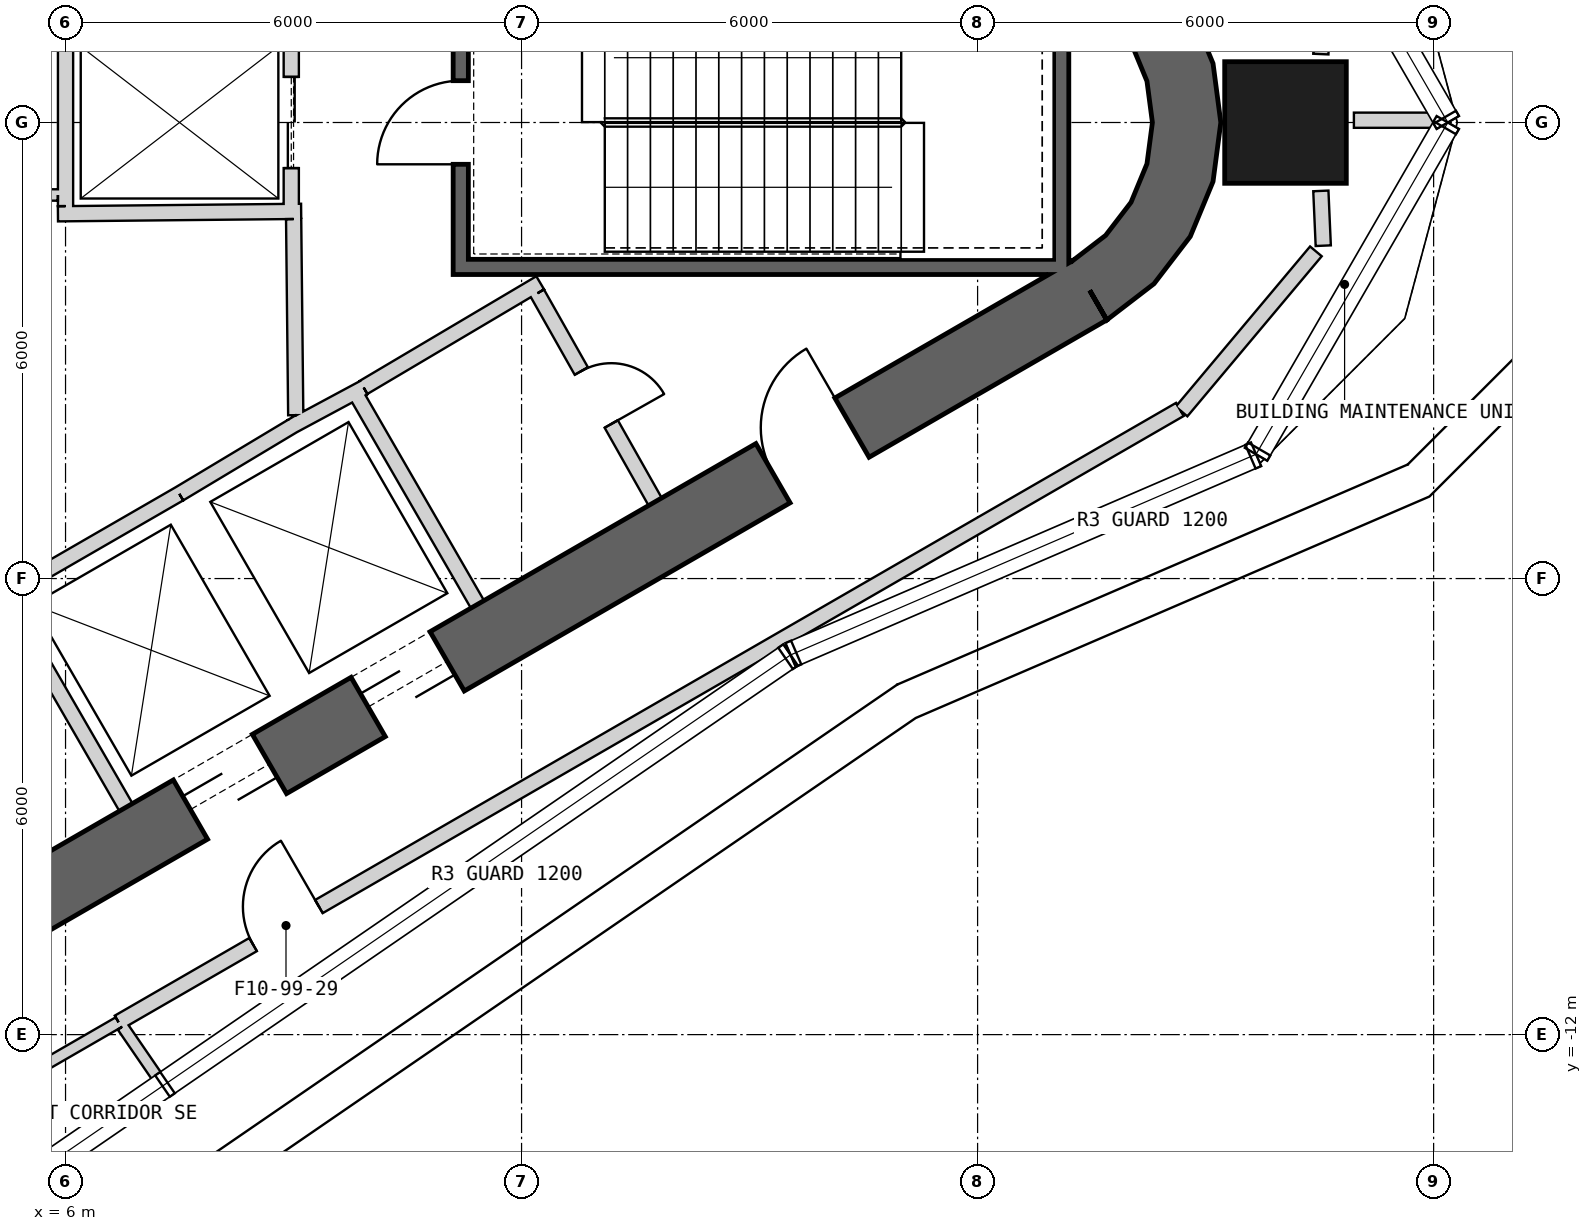
"""IFC4 building model, lengths in metres.
Left out: names, types, materials, properties, quantities, classifications, styles, units other than length and angle.
Written with IfcOpenShell. Run it as: python <this file> out.ifc"""

import sys

from ifc_helpers import new_model, si_unit, direction, frame, frame_2d, origin, origin_2d, place, context, subcontext, project, spatial, polyline, rectangle, outline, extrude, element, fill, save


model = new_model("IFC4")
c1 = context("Model", 3, precision=1e-05, world=origin(), true_north=direction((0.0, 1.0)))
c2 = subcontext(c1, "Body", "Model", "MODEL_VIEW")
j1 = project(units=[si_unit("LENGTHUNIT", "METRE"), si_unit("PLANEANGLEUNIT", "RADIAN")], contexts=[c1])
p1 = place(None, origin())
s1 = spatial("IfcSite", under=j1, at=p1, CompositionType="ELEMENT")
p2 = place(p1, origin())
s2 = spatial("IfcBuilding", under=s1, at=p2, CompositionType="ELEMENT")
p3 = place(p2, frame((0.0, 0.0, 440.3)))
s3 = spatial("IfcBuildingStorey", under=s2, at=p3, CompositionType="ELEMENT", Elevation=440.3)
p4 = place(p3, frame((22.051, 0.0, 0.0), z_axis=(0.0, 0.0, 1.0), x_axis=(1.0, 0.0, 0.0)))
e1 = element("IfcColumn", 1, at=p4, inside=s3, PredefinedType="COLUMN", context=c2, shape_type="SweptSolid", body=[
    extrude(rectangle(XDim=1.6, YDim=1.6, at=origin_2d()), origin(), (0.0, 0.0, 1.0), 4.7),
])
p5 = place(p3, frame((-7.825, -17.97, 0.0), z_axis=(0.0, 0.0, 1.0), x_axis=(0.866028369851, 0.499994862586, 0.0)))
e2 = element("IfcWall", 2, at=p5, inside=s3, PredefinedType="SHEAR", context=c2, shape_type="SweptSolid", body=[
    extrude(rectangle(XDim=31.523, YDim=0.9, at=frame_2d((15.762, 0.0))), origin(), (0.0, 0.0, 1.0), 4.7),
])
p6 = place(p5, frame((17.862, 0.0, 0.0)))
e3 = element("IfcOpeningElement", 3, at=p6, cuts=e2, PredefinedType="OPENING", context=c2, shape_type="SweptSolid", body=[
    extrude(rectangle(XDim=1.2, YDim=2.4, at=frame_2d((0.6, 1.2))), frame((0.0, 0.46, 0.0), z_axis=(0.0, -1.0, 0.0), x_axis=(1.0, 0.0, 0.0)), (0.0, 0.0, 1.0), 0.92),
])
p7 = place(p5, frame((20.562, 0.0, 0.0)))
e4 = element("IfcOpeningElement", 4, at=p7, cuts=e2, PredefinedType="OPENING", context=c2, shape_type="SweptSolid", body=[
    extrude(rectangle(XDim=1.2, YDim=2.4, at=frame_2d((0.6, 1.2))), frame((0.0, 0.46, 0.0), z_axis=(0.0, -1.0, 0.0), x_axis=(1.0, 0.0, 0.0)), (0.0, 0.0, 1.0), 0.92),
])
p8 = place(p5, frame((26.712, 0.0, 0.0)))
e5 = element("IfcOpeningElement", 5, at=p8, cuts=e2, PredefinedType="OPENING", context=c2, shape_type="SweptSolid", body=[
    extrude(rectangle(XDim=1.2, YDim=2.4, at=frame_2d((0.6, 1.2))), frame((0.0, 0.46, 0.0), z_axis=(0.0, -1.0, 0.0), x_axis=(1.0, 0.0, 0.0)), (0.0, 0.0, 1.0), 0.92),
])
p9 = place(p5, frame((3.612, 0.0, 0.0)))
e6 = element("IfcOpeningElement", 6, at=p9, cuts=e2, PredefinedType="OPENING", context=c2, shape_type="SweptSolid", body=[
    extrude(rectangle(XDim=1.2, YDim=2.4, at=frame_2d((0.6, 1.2))), frame((0.0, 0.46, 0.0), z_axis=(0.0, -1.0, 0.0), x_axis=(1.0, 0.0, 0.0)), (0.0, 0.0, 1.0), 0.92),
])
p10 = place(p3, origin())
e7 = element("IfcWall", 7, at=p10, inside=s3, PredefinedType="SHEAR", context=c2, shape_type="SweptSolid", body=[
    extrude(outline(polyline([(19.7, -2.598), (20.321, -2.121), (20.798, -1.5), (21.098, -0.777), (21.2, 0.0), (21.098, 0.777), (20.798, 1.5), (20.321, 2.121), (19.7, 2.598), (19.25, 1.819), (19.685, 1.485), (20.019, 1.05), (20.229, 0.543), (20.3, 0.0), (20.229, -0.543), (20.019, -1.05), (19.685, -1.485), (19.25, -1.819), (19.7, -2.598)])), origin(), (0.0, 0.0, 1.0), 4.7),
])
p11 = place(p3, frame((6.795, -9.01, 0.0), z_axis=(0.0, 0.0, 1.0), x_axis=(-0.499984717929, 0.866034226713, 0.0)))
e8 = element("IfcWall", 8, at=p11, inside=s3, PredefinedType="PLUMBINGWALL", context=c2, shape_type="SweptSolid", body=[
    extrude(rectangle(XDim=3.25, YDim=0.2, at=frame_2d((1.625, 0.0))), origin(), (0.0, 0.0, 1.0), 4.7),
])
p12 = place(p3, frame((5.159, -6.236, 0.0), z_axis=(0.0, 0.0, 1.0), x_axis=(0.866036505625, 0.499980770555, 0.0)))
e9 = element("IfcWall", 9, at=p12, inside=s3, PredefinedType="PLUMBINGWALL", context=c2, shape_type="SweptSolid", body=[
    extrude(rectangle(XDim=2.7, YDim=0.2, at=frame_2d((1.35, 0.0))), origin(), (0.0, 0.0, 1.0), 4.7),
])
p13 = place(p3, frame((9.795, -3.525, 0.0), z_axis=(0.0, 0.0, 1.0), x_axis=(0.499984717929, -0.866034226713, 0.0)))
e10 = element("IfcWall", 10, at=p13, inside=s3, PredefinedType="PLUMBINGWALL", context=c2, shape_type="SweptSolid", body=[
    extrude(rectangle(XDim=3.25, YDim=0.2, at=frame_2d((1.625, 0.0))), origin(), (0.0, 0.0, 1.0), 4.7),
])
p14 = place(p3, frame((8.974, -3.999, 0.0), z_axis=(0.0, 0.0, 1.0), x_axis=(0.880907015104, 0.473289373154, 0.0)))
e11 = element("IfcWall", 11, at=p14, inside=s3, PredefinedType="PLUMBINGWALL", context=c2, shape_type="SweptSolid", body=[
    extrude(rectangle(XDim=1.078, YDim=0.2, at=frame_2d((0.539, 0.0))), origin(), (0.0, 0.0, 1.0), 4.7),
])
p15 = place(p3, frame((7.497, -4.886, 0.0), z_axis=(0.0, 0.0, 1.0), x_axis=(0.857516281273, 0.51445682749, 0.0)))
e12 = element("IfcWall", 12, at=p15, inside=s3, PredefinedType="PLUMBINGWALL", context=c2, shape_type="SweptSolid", body=[
    extrude(rectangle(XDim=1.845, YDim=0.2, at=frame_2d((0.922, 0.0))), origin(), (0.0, 0.0, 1.0), 4.7),
])
p16 = place(p3, frame((19.1, -2.0, -0.25), z_axis=(0.0, 0.0, 1.0), x_axis=(0.0, 1.0, 0.0)))
e13 = element("IfcWall", 13, at=p16, inside=s3, PredefinedType="SHEAR", context=c2, shape_type="SweptSolid", body=[
    extrude(rectangle(XDim=3.8, YDim=0.2, at=frame_2d((1.9, 0.0))), origin(), (0.0, 0.0, 1.0), 4.95),
])
p17 = place(p3, frame((11.1, -1.9, -0.25), z_axis=(0.0, 0.0, 1.0), x_axis=(1.0, 0.0, 0.0)))
e14 = element("IfcWall", 14, at=p17, inside=s3, PredefinedType="SHEAR", context=c2, shape_type="SweptSolid", body=[
    extrude(rectangle(XDim=7.9, YDim=0.2, at=frame_2d((3.95, 0.0))), origin(), (0.0, 0.0, 1.0), 4.95),
])
p18 = place(p3, frame((11.2, -1.8, -0.25), z_axis=(0.0, 0.0, 1.0), x_axis=(0.0, 1.0, 0.0)))
e15 = element("IfcWall", 15, at=p18, inside=s3, PredefinedType="SHEAR", context=c2, shape_type="SweptSolid", body=[
    extrude(rectangle(XDim=3.6, YDim=0.2, at=frame_2d((1.8, 0.0))), origin(), (0.0, 0.0, 1.0), 4.95),
])
p19 = place(p18, frame((1.25, 0.0, 0.25)))
e16 = element("IfcOpeningElement", 16, at=p19, cuts=e15, PredefinedType="OPENING", context=c2, shape_type="SweptSolid", body=[
    extrude(rectangle(XDim=1.1, YDim=2.1, at=frame_2d((0.55, 1.05))), frame((0.0, 0.11, 0.0), z_axis=(0.0, -1.0, 0.0), x_axis=(1.0, 0.0, 0.0)), (0.0, 0.0, 1.0), 0.22),
])
p20 = place(p3, frame((8.97, 1.2, 0.0), z_axis=(0.0, 0.0, 1.0), x_axis=(0.0, -1.0, 0.0)))
e17 = element("IfcWall", 17, at=p20, inside=s3, PredefinedType="PLUMBINGWALL", context=c2, shape_type="SweptSolid", body=[
    extrude(rectangle(XDim=2.4, YDim=0.2, at=frame_2d((1.2, 0.0))), origin(), (0.0, 0.0, 1.0), 4.7),
])
p21 = place(p20, frame((0.6, 0.0, 0.0)))
e18 = element("IfcOpeningElement", 18, at=p21, cuts=e17, PredefinedType="OPENING", context=c2, shape_type="SweptSolid", body=[
    extrude(rectangle(XDim=1.2, YDim=2.4, at=frame_2d((0.6, 1.2))), frame((0.0, 0.11, 0.0), z_axis=(0.0, -1.0, 0.0), x_axis=(1.0, 0.0, 0.0)), (0.0, 0.0, 1.0), 0.22),
])
p22 = place(p3, frame((9.1, -1.169, 0.0), z_axis=(0.0, 0.0, 1.0), x_axis=(-0.999950064753, -0.009993397809, 0.0)))
e19 = element("IfcWall", 19, at=p22, inside=s3, PredefinedType="PLUMBINGWALL", context=c2, shape_type="SweptSolid", body=[
    extrude(rectangle(XDim=3.2, YDim=0.2, at=frame_2d((1.6, 0.0))), origin(), (0.0, 0.0, 1.0), 4.7),
])
p23 = place(p3, frame((6.0, -1.1, 0.0), z_axis=(0.0, 0.0, 1.0), x_axis=(0.0, 1.0, 0.0)))
e20 = element("IfcWall", 20, at=p23, inside=s3, PredefinedType="PLUMBINGWALL", context=c2, shape_type="SweptSolid", body=[
    extrude(rectangle(XDim=2.4, YDim=0.2, at=frame_2d((1.2, 0.0))), origin(), (0.0, 0.0, 1.0), 4.7),
])
p24 = place(p3, frame((12.245, -2.109, 0.0), z_axis=(0.0, 0.0, 1.0), x_axis=(-0.860414880418, -0.509594185166, 0.0)))
e21 = element("IfcWall", 21, at=p24, inside=s3, PredefinedType="PARTITIONING", context=c2, shape_type="SweptSolid", body=[
    extrude(rectangle(XDim=2.7, YDim=0.2, at=frame_2d((1.35, 0.0))), origin(), (0.0, 0.0, 1.0), 4.7),
])
p25 = place(p3, frame((13.758, -4.99, 0.0), z_axis=(0.0, 0.0, 1.0), x_axis=(-0.491993409184, 0.87059892334, 0.0)))
e22 = element("IfcWall", 22, at=p25, inside=s3, PredefinedType="PARTITIONING", context=c2, shape_type="SweptSolid", body=[
    extrude(rectangle(XDim=3.15, YDim=0.2, at=frame_2d((1.575, 0.0))), origin(), (0.0, 0.0, 1.0), 4.7),
])
p26 = place(p25, frame((1.175, 0.0, 0.0)))
e23 = element("IfcOpeningElement", 23, at=p26, cuts=e22, PredefinedType="OPENING", context=c2, shape_type="SweptSolid", body=[
    extrude(rectangle(XDim=0.8, YDim=2.1, at=frame_2d((0.4, 1.05))), frame((0.0, 0.11, 0.0), z_axis=(0.0, -1.0, 0.0), x_axis=(1.0, 0.0, 0.0)), (0.0, 0.0, 1.0), 0.22),
])
p27 = place(p3, frame((9.029, -3.851, 0.0), z_axis=(0.0, 0.0, 1.0), x_axis=(-0.010784614026, 0.999941844359, 0.0)))
e24 = element("IfcWall", 24, at=p27, inside=s3, PredefinedType="PARTITIONING", context=c2, shape_type="SweptSolid", body=[
    extrude(rectangle(XDim=2.581, YDim=0.2, at=frame_2d((1.291, 0.0))), origin(), (0.0, 0.0, 1.0), 4.7),
])
p28 = place(p3, frame((5.9, -0.954, 0.0), z_axis=(0.0, 0.0, 1.0), x_axis=(-0.999979813999, 0.006353864523, 0.0)))
e25 = element("IfcWall", 25, at=p28, inside=s3, PredefinedType="PLUMBINGWALL", context=c2, shape_type="SweptSolid", body=[
    extrude(rectangle(XDim=4.534, YDim=0.15, at=frame_2d((2.267, 0.0))), origin(), (0.0, 0.0, 1.0), 4.7),
])
p29 = place(p28, frame((1.867, 0.0, 0.0)))
e26 = element("IfcOpeningElement", 26, at=p29, cuts=e25, PredefinedType="OPENING", context=c2, shape_type="SweptSolid", body=[
    extrude(rectangle(XDim=0.8, YDim=2.1, at=frame_2d((0.4, 1.05))), frame((0.0, 0.085, 0.0), z_axis=(0.0, -1.0, 0.0), x_axis=(1.0, 0.0, 0.0)), (0.0, 0.0, 1.0), 0.17),
])
p30 = place(p3, frame((22.951, 0.03, 0.0), z_axis=(0.0, 0.0, 1.0), x_axis=(1.0, 0.0, 0.0)))
e27 = element("IfcWall", 27, at=p30, inside=s3, PredefinedType="PARTITIONING", context=c2, shape_type="SweptSolid", body=[
    extrude(rectangle(XDim=1.098, YDim=0.2, at=frame_2d((0.549, 0.0))), origin(), (0.0, 0.0, 1.0), 4.7),
])
p31 = place(p3, frame((22.516, 0.9, 0.0), z_axis=(0.0, 0.0, 1.0), x_axis=(0.044289222506, 0.99901875096, 0.0)))
e28 = element("IfcWall", 28, at=p31, inside=s3, PredefinedType="PARTITIONING", context=c2, shape_type="SweptSolid", body=[
    extrude(rectangle(XDim=0.535, YDim=0.2, at=frame_2d((0.267, 0.0))), origin(), (0.0, 0.0, 1.0), 4.7),
])
p32 = place(p3, frame((-7.213, -19.868, 0.0), z_axis=(0.0, 0.0, 1.0), x_axis=(0.866026120779, 0.499998758127, 0.0)))
e29 = element("IfcWall", 29, at=p32, inside=s3, PredefinedType="PLUMBINGWALL", context=c2, shape_type="SweptSolid", body=[
    extrude(rectangle(XDim=16.062, YDim=0.15, at=frame_2d((8.031, 0.0))), origin(), (0.0, 0.0, 1.0), 4.7),
])
p33 = place(p32, frame((7.675, 0.0, 0.0)))
e30 = element("IfcOpeningElement", 30, at=p33, cuts=e29, PredefinedType="OPENING", context=c2, shape_type="SweptSolid", body=[
    extrude(rectangle(XDim=0.8, YDim=2.1, at=frame_2d((0.4, 1.05))), frame((0.0, 0.085, 0.0), z_axis=(0.0, -1.0, 0.0), x_axis=(1.0, 0.0, 0.0)), (0.0, 0.0, 1.0), 0.17),
])
p34 = place(p3, frame((22.548, -1.621, 0.0), z_axis=(0.0, 0.0, 1.0), x_axis=(-0.043980430429, 0.999032392738, 0.0)))
e31 = element("IfcWall", 31, at=p34, inside=s3, PredefinedType="PARTITIONING", context=c2, shape_type="SweptSolid", body=[
    extrude(rectangle(XDim=0.722, YDim=0.2, at=frame_2d((0.361, 0.0))), origin(), (0.0, 0.0, 1.0), 4.7),
])
p35 = place(p3, frame((20.684, -3.802, 0.0), z_axis=(0.0, 0.0, 1.0), x_axis=(0.642800550542, 0.766033584265, 0.0)))
e32 = element("IfcWall", 32, at=p35, inside=s3, PredefinedType="PARTITIONING", context=c2, shape_type="SweptSolid", body=[
    extrude(rectangle(XDim=2.75, YDim=0.2, at=frame_2d((1.375, 0.0))), origin(), (0.0, 0.0, 1.0), 4.7),
])
p36 = place(p3, frame((6.698, -11.837, 0.0), z_axis=(0.0, 0.0, 1.0), x_axis=(0.866022444471, 0.500005125646, 0.0)))
e33 = element("IfcWall", 33, at=p36, inside=s3, PredefinedType="PARTITIONING", context=c2, shape_type="SweptSolid", body=[
    extrude(rectangle(XDim=16.124, YDim=0.2, at=frame_2d((8.062, 0.0))), origin(), (0.0, 0.0, 1.0), 4.7),
])
p37 = place(p36, frame((2.044, 0.0, 0.0)))
e34 = element("IfcOpeningElement", 34, at=p37, cuts=e33, PredefinedType="OPENING", context=c2, shape_type="SweptSolid", body=[
    extrude(rectangle(XDim=1.0, YDim=2.1, at=frame_2d((0.5, 1.05))), frame((0.0, 0.11, 0.0), z_axis=(0.0, -1.0, 0.0), x_axis=(1.0, 0.0, 0.0)), (0.0, 0.0, 1.0), 0.22),
])
p38 = place(p3, frame((7.213, -12.568, 0.0), z_axis=(0.0, 0.0, 1.0), x_axis=(-0.565933909506, 0.824450611056, 0.0)))
e35 = element("IfcWall", 35, at=p38, inside=s3, PredefinedType="PLUMBINGWALL", context=c2, shape_type="SweptSolid", body=[
    extrude(rectangle(XDim=0.819, YDim=0.15, at=frame_2d((0.409, 0.0))), origin(), (0.0, 0.0, 1.0), 4.7),
])
p39 = place(p19, origin())
e36 = element("IfcDoor", 36, at=p39, inside=s3, OperationType="SINGLE_SWING_LEFT", PredefinedType="USERDEFINED", context=c2, shape_type="SweptSolid", body=[
    extrude(rectangle(XDim=1.1, YDim=2.1, at=frame_2d((0.55, 1.05))), frame((0.0, 0.025, 0.0), z_axis=(0.0, -1.0, 0.0), x_axis=(1.0, 0.0, 0.0)), (0.0, 0.0, 1.0), 0.05),
])
fill(e16, e36)
p40 = place(p21, origin())
e37 = element("IfcDoor", 37, at=p40, inside=s3, OperationType="SLIDING_TO_LEFT", PredefinedType="USERDEFINED", context=c2, shape_type="SweptSolid", body=[
    extrude(rectangle(XDim=1.2, YDim=2.4, at=frame_2d((0.6, 1.2))), frame((0.0, 0.025, 0.0), z_axis=(0.0, -1.0, 0.0), x_axis=(1.0, 0.0, 0.0)), (0.0, 0.0, 1.0), 0.05),
])
fill(e18, e37)
p41 = place(p26, origin())
e38 = element("IfcDoor", 38, at=p41, inside=s3, OperationType="SINGLE_SWING_LEFT", PredefinedType="USERDEFINED", context=c2, shape_type="SweptSolid", body=[
    extrude(rectangle(XDim=0.8, YDim=2.1, at=frame_2d((0.4, 1.05))), frame((0.0, 0.025, 0.0), z_axis=(0.0, -1.0, 0.0), x_axis=(1.0, 0.0, 0.0)), (0.0, 0.0, 1.0), 0.05),
])
fill(e23, e38)
p42 = place(p37, origin())
e39 = element("IfcDoor", 39, at=p42, inside=s3, OperationType="SINGLE_SWING_RIGHT", PredefinedType="USERDEFINED", context=c2, shape_type="SweptSolid", body=[
    extrude(rectangle(XDim=1.0, YDim=2.1, at=frame_2d((0.5, 1.05))), frame((0.0, 0.025, 0.0), z_axis=(0.0, -1.0, 0.0), x_axis=(1.0, 0.0, 0.0)), (0.0, 0.0, 1.0), 0.05),
])
fill(e34, e39)
p43 = place(p6, origin())
e40 = element("IfcDoor", 40, at=p43, inside=s3, OperationType="SLIDING_TO_LEFT", PredefinedType="USERDEFINED", context=c2, shape_type="SweptSolid", body=[
    extrude(rectangle(XDim=1.2, YDim=2.4, at=frame_2d((0.6, 1.2))), frame((0.0, 0.025, 0.0), z_axis=(0.0, -1.0, 0.0), x_axis=(1.0, 0.0, 0.0)), (0.0, 0.0, 1.0), 0.05),
])
fill(e3, e40)
p44 = place(p7, origin())
e41 = element("IfcDoor", 41, at=p44, inside=s3, OperationType="SLIDING_TO_LEFT", PredefinedType="USERDEFINED", context=c2, shape_type="SweptSolid", body=[
    extrude(rectangle(XDim=1.2, YDim=2.4, at=frame_2d((0.6, 1.2))), frame((0.0, 0.025, 0.0), z_axis=(0.0, -1.0, 0.0), x_axis=(1.0, 0.0, 0.0)), (0.0, 0.0, 1.0), 0.05),
])
fill(e4, e41)
p45 = place(p8, origin())
e42 = element("IfcDoor", 42, at=p45, inside=s3, OperationType="SINGLE_SWING_RIGHT", PredefinedType="USERDEFINED", context=c2, shape_type="SweptSolid", body=[
    extrude(rectangle(XDim=1.2, YDim=2.4, at=frame_2d((0.6, 1.2))), frame((0.0, 0.025, 0.0), z_axis=(0.0, -1.0, 0.0), x_axis=(1.0, 0.0, 0.0)), (0.0, 0.0, 1.0), 0.05),
])
fill(e5, e42)
save(model, sys.argv[1])
